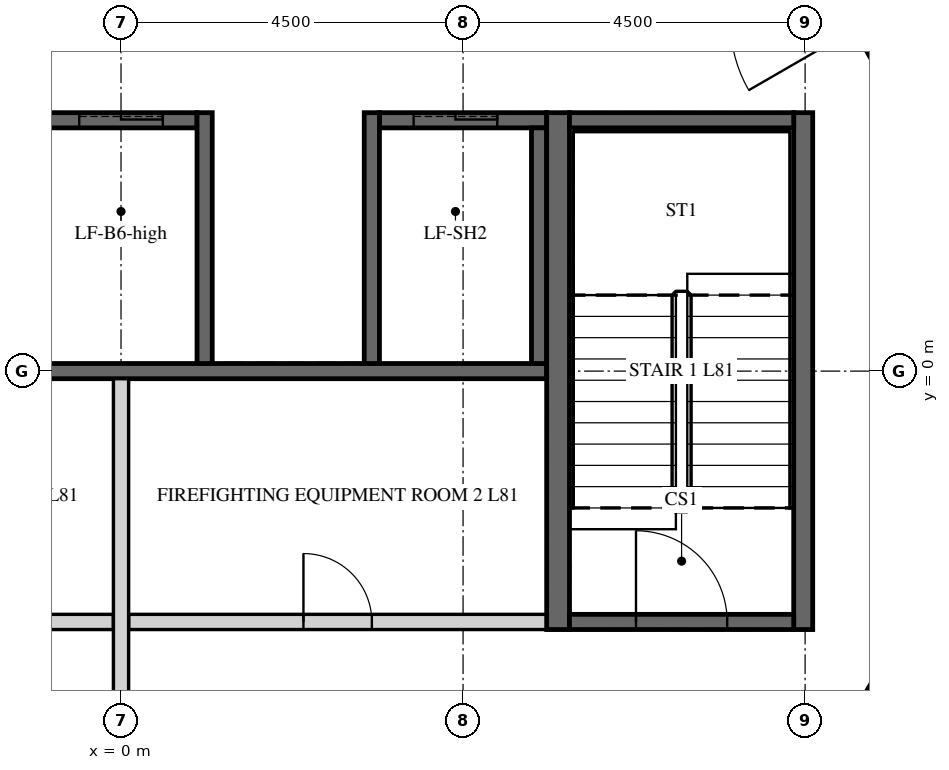
"""IFC4 building model, lengths in metres.
Left out: names, types, materials, properties, quantities, classifications, styles, units other than length and angle.
Written with IfcOpenShell. Run it as: python <this file> out.ifc"""

import sys

from ifc_helpers import new_model, si_unit, direction, frame, frame_2d, origin, place, context, subcontext, project, spatial, polyline, rectangle, outline, extrude, element, fill, save


model = new_model("IFC4")
c1 = context("Model", 3, precision=1e-05, world=origin(), true_north=direction((0.0, 1.0)))
c2 = subcontext(c1, "Body", "Model", "MODEL_VIEW")
j1 = project(units=[si_unit("LENGTHUNIT", "METRE"), si_unit("PLANEANGLEUNIT", "RADIAN")], contexts=[c1])
p1 = place(None, origin())
s1 = spatial("IfcSite", under=j1, at=p1, CompositionType="ELEMENT")
p2 = place(p1, origin())
s2 = spatial("IfcBuilding", under=s1, at=p2, CompositionType="ELEMENT")
p3 = place(p2, frame((0.0, 0.0, 334.2)))
s3 = spatial("IfcBuildingStorey", under=s2, at=p3, CompositionType="ELEMENT", Elevation=334.2)
p4 = place(p3, frame((6.235, -10.8, -0.15), z_axis=(0.0, 0.0, 1.0), x_axis=(0.499996419489, 0.866027470984, 0.0)))
e1 = element("IfcWall", 1, at=p4, inside=s3, PredefinedType="SHEAR", context=c2, shape_type="SweptSolid", body=[
    extrude(outline(polyline([(-0.115, -0.2), (12.586, -0.2), (12.355, 0.2), (0.115, 0.2), (-0.115, -0.2)])), origin(), (0.0, 0.0, 1.0), 3.75),
])
p5 = place(p4, frame((5.364, 0.0, 0.15)))
e2 = element("IfcOpeningElement", 2, at=p5, cuts=e1, PredefinedType="OPENING", context=c2, shape_type="SweptSolid", body=[
    extrude(rectangle(XDim=1.8, YDim=2.4, at=frame_2d((0.9, 1.2))), frame((0.0, 0.21, 0.0), z_axis=(0.0, -1.0, 0.0), x_axis=(1.0, 0.0, 0.0)), (0.0, 0.0, 1.0), 0.42),
])
p6 = place(p3, frame((12.471, 0.0, -0.15), z_axis=(0.0, 0.0, 1.0), x_axis=(-0.499996419489, 0.866027470984, 0.0)))
e3 = element("IfcWall", 3, at=p6, inside=s3, PredefinedType="SHEAR", context=c2, shape_type="SweptSolid", body=[
    extrude(outline(polyline([(-0.115, -0.2), (12.586, -0.2), (12.355, 0.2), (0.115, 0.2), (-0.115, -0.2)])), origin(), (0.0, 0.0, 1.0), 3.75),
])
p7 = place(p6, frame((5.306, 0.0, 0.15)))
e4 = element("IfcOpeningElement", 4, at=p7, cuts=e3, PredefinedType="OPENING", context=c2, shape_type="SweptSolid", body=[
    extrude(rectangle(XDim=1.8, YDim=2.4, at=frame_2d((0.9, 1.2))), frame((0.0, 0.21, 0.0), z_axis=(0.0, -1.0, 0.0), x_axis=(1.0, 0.0, 0.0)), (0.0, 0.0, 1.0), 0.42),
])
p8 = place(p3, frame((-5.6, 3.3, -0.25), z_axis=(0.0, 0.0, 1.0), x_axis=(1.0, 0.0, 0.0)))
e5 = element("IfcWall", 5, at=p8, inside=s3, PredefinedType="SHEAR", context=c2, shape_type="SweptSolid", body=[
    extrude(rectangle(XDim=6.6, YDim=0.2, at=frame_2d((3.3, 0.0))), origin(), (0.0, 0.0, 1.0), 3.9),
])
p9 = place(p8, frame((0.65, 0.0, 0.25)))
e6 = element("IfcOpeningElement", 6, at=p9, cuts=e5, PredefinedType="OPENING", context=c2, shape_type="SweptSolid", body=[
    extrude(rectangle(XDim=1.1, YDim=2.1, at=frame_2d((0.55, 1.05))), frame((0.0, 0.11, 0.0), z_axis=(0.0, -1.0, 0.0), x_axis=(1.0, 0.0, 0.0)), (0.0, 0.0, 1.0), 0.22),
])
p10 = place(p8, frame((2.85, 0.0, 0.25)))
e7 = element("IfcOpeningElement", 7, at=p10, cuts=e5, PredefinedType="OPENING", context=c2, shape_type="SweptSolid", body=[
    extrude(rectangle(XDim=1.1, YDim=2.1, at=frame_2d((0.55, 1.05))), frame((0.0, 0.11, 0.0), z_axis=(0.0, -1.0, 0.0), x_axis=(1.0, 0.0, 0.0)), (0.0, 0.0, 1.0), 0.22),
])
p11 = place(p8, frame((5.05, 0.0, 0.25)))
e8 = element("IfcOpeningElement", 8, at=p11, cuts=e5, PredefinedType="OPENING", context=c2, shape_type="SweptSolid", body=[
    extrude(rectangle(XDim=1.1, YDim=2.1, at=frame_2d((0.55, 1.05))), frame((0.0, 0.11, 0.0), z_axis=(0.0, -1.0, 0.0), x_axis=(1.0, 0.0, 0.0)), (0.0, 0.0, 1.0), 0.22),
])
p12 = place(p3, frame((3.4, 3.3, -0.25), z_axis=(0.0, 0.0, 1.0), x_axis=(1.0, 0.0, 0.0)))
e9 = element("IfcWall", 9, at=p12, inside=s3, PredefinedType="SHEAR", context=c2, shape_type="SweptSolid", body=[
    extrude(rectangle(XDim=2.2, YDim=0.2, at=frame_2d((1.1, 0.0))), origin(), (0.0, 0.0, 1.0), 3.9),
])
p13 = place(p12, frame((0.45, 0.0, 0.25)))
e10 = element("IfcOpeningElement", 10, at=p13, cuts=e9, PredefinedType="OPENING", context=c2, shape_type="SweptSolid", body=[
    extrude(rectangle(XDim=1.1, YDim=2.1, at=frame_2d((0.55, 1.05))), frame((0.0, 0.11, 0.0), z_axis=(0.0, -1.0, 0.0), x_axis=(1.0, 0.0, 0.0)), (0.0, 0.0, 1.0), 0.22),
])
p14 = place(p3, frame((-5.6, 0.0, -0.25), z_axis=(0.0, 0.0, 1.0), x_axis=(1.0, 0.0, 0.0)))
e11 = element("IfcWall", 11, at=p14, inside=s3, PredefinedType="SHEAR", context=c2, shape_type="SweptSolid", body=[
    extrude(rectangle(XDim=11.2, YDim=0.2, at=frame_2d((5.6, 0.0))), origin(), (0.0, 0.0, 1.0), 3.9),
])
for number, where, z_axis, x_axis in (
    (12, (1.1, 0.1, -0.25), (0.0, 0.0, 1.0), (0.0, 1.0, 0.0)),
    (13, (3.3, 0.1, -0.25), (0.0, 0.0, 1.0), (0.0, 1.0, 0.0)),
):
    element("IfcWall", number, at=place(p3, frame(where, z_axis=z_axis, x_axis=x_axis)), inside=s3, PredefinedType="SHEAR", context=c2, shape_type="SweptSolid", body=[
        extrude(rectangle(XDim=3.3, YDim=0.2, at=frame_2d((1.65, 0.0))), origin(), (0.0, 0.0, 1.0), 3.9),
    ])
p15 = place(p3, frame((5.5, 0.1, -0.25), z_axis=(0.0, 0.0, 1.0), x_axis=(0.0, 1.0, 0.0)))
e14 = element("IfcWall", 14, at=p15, inside=s3, PredefinedType="SHEAR", context=c2, shape_type="SweptSolid", body=[
    extrude(rectangle(XDim=3.1, YDim=0.2, at=frame_2d((1.55, 0.0))), origin(), (0.0, 0.0, 1.0), 3.9),
])
p16 = place(p3, frame((-5.6, -3.3, 0.0), z_axis=(0.0, 0.0, 1.0), x_axis=(1.0, 0.0, 0.0)))
e15 = element("IfcWall", 15, at=p16, inside=s3, PredefinedType="PARTITIONING", context=c2, shape_type="SweptSolid", body=[
    extrude(rectangle(XDim=5.5, YDim=0.2, at=frame_2d((2.75, 0.0))), origin(), (0.0, 0.0, 1.0), 3.65),
])
p17 = place(p16, frame((2.3, 0.0, 0.0)))
e16 = element("IfcOpeningElement", 16, at=p17, cuts=e15, PredefinedType="OPENING", context=c2, shape_type="SweptSolid", body=[
    extrude(rectangle(XDim=0.9, YDim=2.1, at=frame_2d((0.45, 1.05))), frame((0.0, 0.11, 0.0), z_axis=(0.0, -1.0, 0.0), x_axis=(1.0, 0.0, 0.0)), (0.0, 0.0, 1.0), 0.22),
])
p18 = place(p3, frame((0.1, -3.3, 0.0), z_axis=(0.0, 0.0, 1.0), x_axis=(1.0, 0.0, 0.0)))
e17 = element("IfcWall", 17, at=p18, inside=s3, PredefinedType="PARTITIONING", context=c2, shape_type="SweptSolid", body=[
    extrude(rectangle(XDim=5.5, YDim=0.2, at=frame_2d((2.75, 0.0))), origin(), (0.0, 0.0, 1.0), 3.65),
])
p19 = place(p18, frame((2.3, 0.0, 0.0)))
e18 = element("IfcOpeningElement", 18, at=p19, cuts=e17, PredefinedType="OPENING", context=c2, shape_type="SweptSolid", body=[
    extrude(rectangle(XDim=0.9, YDim=2.1, at=frame_2d((0.45, 1.05))), frame((0.0, 0.11, 0.0), z_axis=(0.0, -1.0, 0.0), x_axis=(1.0, 0.0, 0.0)), (0.0, 0.0, 1.0), 0.22),
])
p20 = place(p3, frame((0.0, -6.2, 0.0), z_axis=(0.0, 0.0, 1.0), x_axis=(0.0, 1.0, 0.0)))
e19 = element("IfcWall", 19, at=p20, inside=s3, PredefinedType="PARTITIONING", context=c2, shape_type="SweptSolid", body=[
    extrude(rectangle(XDim=6.1, YDim=0.2, at=frame_2d((3.05, 0.0))), origin(), (0.0, 0.0, 1.0), 3.65),
])
p21 = place(p3, frame((5.75, -3.4, -0.25), z_axis=(0.0, 0.0, 1.0), x_axis=(0.0, 1.0, 0.0)))
e20 = element("IfcWall", 20, at=p21, inside=s3, PredefinedType="SHEAR", context=c2, shape_type="SweptSolid", body=[
    extrude(rectangle(XDim=6.8, YDim=0.3, at=frame_2d((3.4, 0.0))), origin(), (0.0, 0.0, 1.0), 3.9),
])
p22 = place(p3, frame((8.975, -3.4, -0.25), z_axis=(0.0, 0.0, 1.0), x_axis=(0.0, 1.0, 0.0)))
e21 = element("IfcWall", 21, at=p22, inside=s3, PredefinedType="SHEAR", context=c2, shape_type="SweptSolid", body=[
    extrude(rectangle(XDim=6.8, YDim=0.25, at=frame_2d((3.4, 0.0))), origin(), (0.0, 0.0, 1.0), 3.9),
])
p23 = place(p3, frame((5.9, 3.3, -0.25), z_axis=(0.0, 0.0, 1.0), x_axis=(1.0, 0.0, 0.0)))
e22 = element("IfcWall", 22, at=p23, inside=s3, PredefinedType="SHEAR", context=c2, shape_type="SweptSolid", body=[
    extrude(rectangle(XDim=2.95, YDim=0.2, at=frame_2d((1.475, 0.0))), origin(), (0.0, 0.0, 1.0), 3.9),
])
p24 = place(p3, frame((5.9, -3.3, -0.25), z_axis=(0.0, 0.0, 1.0), x_axis=(1.0, 0.0, 0.0)))
e23 = element("IfcWall", 23, at=p24, inside=s3, PredefinedType="SHEAR", context=c2, shape_type="SweptSolid", body=[
    extrude(rectangle(XDim=2.95, YDim=0.2, at=frame_2d((1.475, 0.0))), origin(), (0.0, 0.0, 1.0), 3.9),
])
p25 = place(p24, frame((0.875, 0.0, 0.25)))
e24 = element("IfcOpeningElement", 24, at=p25, cuts=e23, PredefinedType="OPENING", context=c2, shape_type="SweptSolid", body=[
    extrude(rectangle(XDim=1.2, YDim=2.4, at=frame_2d((0.6, 1.2))), frame((0.0, 0.11, 0.0), z_axis=(0.0, -1.0, 0.0), x_axis=(1.0, 0.0, 0.0)), (0.0, 0.0, 1.0), 0.22),
])
p26 = place(p3, frame((18.521, -1.171, 0.0), z_axis=(0.0, 0.0, 1.0), x_axis=(-0.559191021435, 0.829038842001, 0.0)))
e25 = element("IfcWall", 25, at=p26, inside=s3, PredefinedType="PARTITIONING", context=c2, shape_type="SweptSolid", body=[
    extrude(rectangle(XDim=16.605, YDim=0.15, at=frame_2d((8.303, 0.0))), origin(), (0.0, 0.0, 1.0), 2.838),
])
p27 = place(p26, frame((9.703, 0.0, 0.0)))
e26 = element("IfcOpeningElement", 26, at=p27, cuts=e25, PredefinedType="OPENING", context=c2, shape_type="SweptSolid", body=[
    extrude(rectangle(XDim=1.0, YDim=2.1, at=frame_2d((0.5, 1.05))), frame((0.0, 0.085, 0.0), z_axis=(0.0, -1.0, 0.0), x_axis=(1.0, 0.0, 0.0)), (0.0, 0.0, 1.0), 0.17),
])
p28 = place(p19, origin())
e27 = element("IfcDoor", 27, at=p28, inside=s3, OperationType="SINGLE_SWING_LEFT", PredefinedType="DOOR", context=c2, shape_type="SweptSolid", body=[
    extrude(rectangle(XDim=0.9, YDim=2.1, at=frame_2d((0.45, 1.05))), frame((0.0, 0.025, 0.0), z_axis=(0.0, -1.0, 0.0), x_axis=(1.0, 0.0, 0.0)), (0.0, 0.0, 1.0), 0.05),
])
fill(e18, e27)
p29 = place(p25, origin())
e28 = element("IfcDoor", 28, at=p29, inside=s3, OperationType="SINGLE_SWING_LEFT", PredefinedType="DOOR", context=c2, shape_type="SweptSolid", body=[
    extrude(rectangle(XDim=1.2, YDim=2.4, at=frame_2d((0.6, 1.2))), frame((0.0, 0.025, 0.0), z_axis=(0.0, -1.0, 0.0), x_axis=(1.0, 0.0, 0.0)), (0.0, 0.0, 1.0), 0.05),
])
fill(e24, e28)
p30 = place(p11, origin())
e29 = element("IfcDoor", 29, at=p30, inside=s3, OperationType="SLIDING_TO_LEFT", PredefinedType="DOOR", context=c2, shape_type="SweptSolid", body=[
    extrude(rectangle(XDim=1.1, YDim=2.1, at=frame_2d((0.55, 1.05))), frame((0.0, 0.025, 0.0), z_axis=(0.0, -1.0, 0.0), x_axis=(1.0, 0.0, 0.0)), (0.0, 0.0, 1.0), 0.05),
])
fill(e8, e29)
p31 = place(p13, origin())
e30 = element("IfcDoor", 30, at=p31, inside=s3, OperationType="SLIDING_TO_LEFT", PredefinedType="DOOR", context=c2, shape_type="SweptSolid", body=[
    extrude(rectangle(XDim=1.1, YDim=2.1, at=frame_2d((0.55, 1.05))), frame((0.0, 0.025, 0.0), z_axis=(0.0, -1.0, 0.0), x_axis=(1.0, 0.0, 0.0)), (0.0, 0.0, 1.0), 0.05),
])
fill(e10, e30)
save(model, sys.argv[1])
